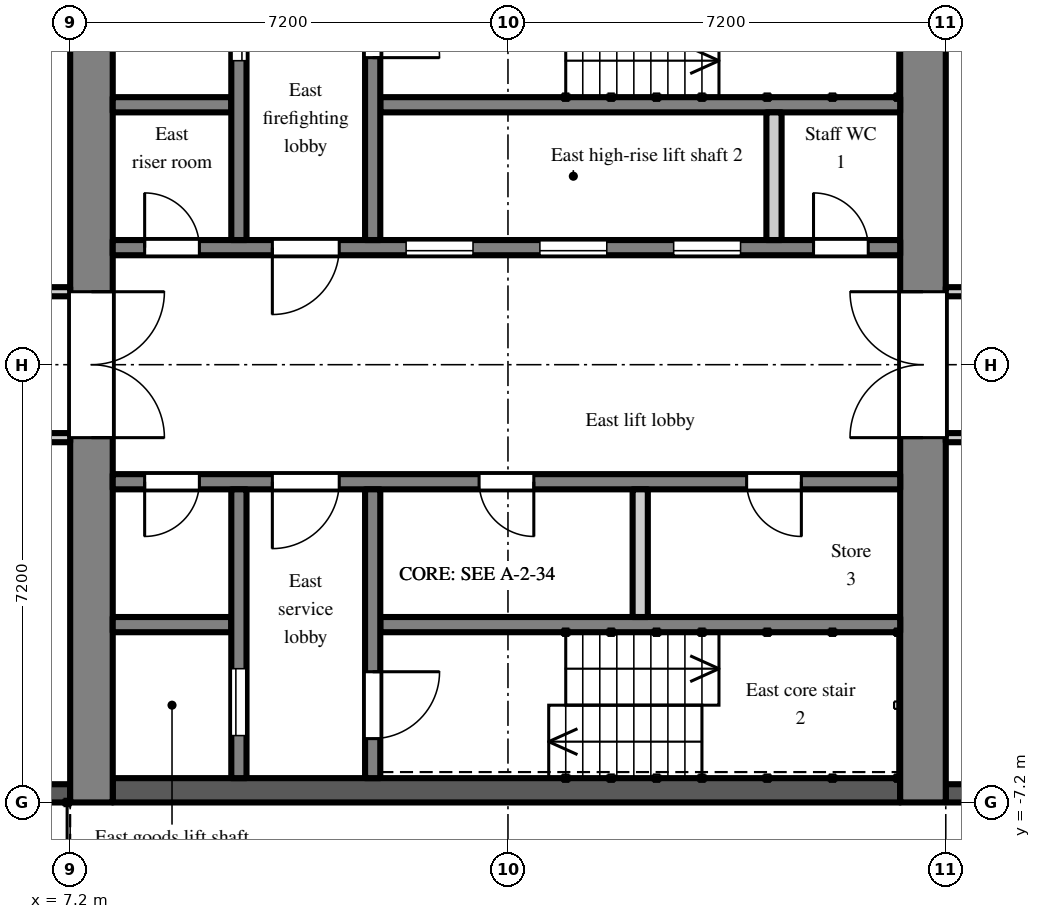
"""IFC4 building model, lengths in metres.
Left out: names, types, materials, properties, quantities, classifications, styles, units other than length and angle.
Written with IfcOpenShell. Run it as: python <this file> out.ifc"""

import sys

from ifc_helpers import new_model, si_unit, direction, frame, frame_2d, origin, place, context, subcontext, project, spatial, rectangle, extrude, element, fill, save


model = new_model("IFC4")
c1 = context("Model", 3, precision=1e-05, world=origin(), true_north=direction((0.0, 1.0)))
c2 = subcontext(c1, "Body", "Model", "MODEL_VIEW")
j1 = project(units=[si_unit("LENGTHUNIT", "METRE"), si_unit("PLANEANGLEUNIT", "RADIAN")], contexts=[c1])
p1 = place(None, origin())
s1 = spatial("IfcSite", under=j1, at=p1, CompositionType="ELEMENT")
p2 = place(p1, origin())
s2 = spatial("IfcBuilding", under=s1, at=p2, CompositionType="ELEMENT")
p3 = place(p2, frame((0.0, 0.0, 198.9)))
s3 = spatial("IfcBuildingStorey", under=s2, at=p3, CompositionType="ELEMENT", Elevation=198.9)
p4 = place(p3, frame((21.6, -7.05, 0.0), z_axis=(0.0, 0.0, 1.0), x_axis=(1.0, 0.0, 0.0)))
e1 = element("IfcWall", 1, at=p4, inside=s3, PredefinedType="SOLIDWALL", context=c2, shape_type="SweptSolid", body=[
    extrude(rectangle(XDim=2.7, YDim=0.3, at=frame_2d((1.35, 0.0))), origin(), (0.0, 0.0, 1.0), 2.3),
])
p5 = place(p4, frame((0.75, 0.0, 0.2)))
e2 = element("IfcOpeningElement", 2, at=p5, cuts=e1, PredefinedType="OPENING", context=c2, shape_type="SweptSolid", body=[
    extrude(rectangle(XDim=1.2, YDim=1.85, at=frame_2d((0.6, 0.925))), frame((0.0, 0.16, 0.0), z_axis=(0.0, -1.0, 0.0), x_axis=(1.0, 0.0, 0.0)), (0.0, 0.0, 1.0), 0.32),
])
p6 = place(p3, frame((4.2, -7.05, 0.0), z_axis=(0.0, 0.0, 1.0), x_axis=(1.0, 0.0, 0.0)))
e3 = element("IfcWall", 3, at=p6, inside=s3, PredefinedType="SOLIDWALL", context=c2, shape_type="SweptSolid", body=[
    extrude(rectangle(XDim=3.0, YDim=0.3, at=frame_2d((1.5, 0.0))), origin(), (0.0, 0.0, 1.0), 2.3),
])
p7 = place(p3, frame((7.55, -7.2, 0.0), z_axis=(0.0, 0.0, 1.0), x_axis=(0.0, 1.0, 0.0)))
e4 = element("IfcWall", 4, at=p7, inside=s3, PredefinedType="SHEAR", context=c2, shape_type="SweptSolid", body=[
    extrude(rectangle(XDim=14.4, YDim=0.7, at=frame_2d((7.2, 0.0))), origin(), (0.0, 0.0, 1.0), 2.6),
])
p8 = place(p7, frame((6.0, 0.0, 0.0)))
e5 = element("IfcOpeningElement", 5, at=p8, cuts=e4, PredefinedType="OPENING", context=c2, shape_type="SweptSolid", body=[
    extrude(rectangle(XDim=2.4, YDim=2.2, at=frame_2d((1.2, 1.1))), frame((0.0, 0.36, 0.0), z_axis=(0.0, -1.0, 0.0), x_axis=(1.0, 0.0, 0.0)), (0.0, 0.0, 1.0), 0.72),
])
p9 = place(p3, frame((21.225, -7.2, 0.0), z_axis=(0.0, 0.0, 1.0), x_axis=(0.0, 1.0, 0.0)))
e6 = element("IfcWall", 6, at=p9, inside=s3, PredefinedType="SHEAR", context=c2, shape_type="SweptSolid", body=[
    extrude(rectangle(XDim=14.4, YDim=0.75, at=frame_2d((7.2, 0.0))), origin(), (0.0, 0.0, 1.0), 2.6),
])
p10 = place(p9, frame((6.0, 0.0, 0.0)))
e7 = element("IfcOpeningElement", 7, at=p10, cuts=e6, PredefinedType="OPENING", context=c2, shape_type="SweptSolid", body=[
    extrude(rectangle(XDim=2.4, YDim=2.2, at=frame_2d((1.2, 1.1))), frame((0.0, 0.385, 0.0), z_axis=(0.0, -1.0, 0.0), x_axis=(1.0, 0.0, 0.0)), (0.0, 0.0, 1.0), 0.77),
])
p11 = place(p3, frame((7.9, 1.925, 0.0), z_axis=(0.0, 0.0, 1.0), x_axis=(1.0, 0.0, 0.0)))
e8 = element("IfcWall", 8, at=p11, inside=s3, PredefinedType="SHEAR", context=c2, shape_type="SweptSolid", body=[
    extrude(rectangle(XDim=12.95, YDim=0.25, at=frame_2d((6.475, 0.0))), origin(), (0.0, 0.0, 1.0), 2.6),
])
p12 = place(p11, frame((4.825, 0.0, 0.0)))
e9 = element("IfcOpeningElement", 9, at=p12, cuts=e8, PredefinedType="OPENING", context=c2, shape_type="SweptSolid", body=[
    extrude(rectangle(XDim=1.1, YDim=2.1, at=frame_2d((0.55, 1.05))), frame((0.0, 0.135, 0.0), z_axis=(0.0, -1.0, 0.0), x_axis=(1.0, 0.0, 0.0)), (0.0, 0.0, 1.0), 0.27),
])
p13 = place(p11, frame((7.025, 0.0, 0.0)))
e10 = element("IfcOpeningElement", 10, at=p13, cuts=e8, PredefinedType="OPENING", context=c2, shape_type="SweptSolid", body=[
    extrude(rectangle(XDim=1.1, YDim=2.1, at=frame_2d((0.55, 1.05))), frame((0.0, 0.135, 0.0), z_axis=(0.0, -1.0, 0.0), x_axis=(1.0, 0.0, 0.0)), (0.0, 0.0, 1.0), 0.27),
])
p14 = place(p11, frame((9.225, 0.0, 0.0)))
e11 = element("IfcOpeningElement", 11, at=p14, cuts=e8, PredefinedType="OPENING", context=c2, shape_type="SweptSolid", body=[
    extrude(rectangle(XDim=1.1, YDim=2.1, at=frame_2d((0.55, 1.05))), frame((0.0, 0.135, 0.0), z_axis=(0.0, -1.0, 0.0), x_axis=(1.0, 0.0, 0.0)), (0.0, 0.0, 1.0), 0.27),
])
p15 = place(p11, frame((0.525, 0.0, 0.0)))
e12 = element("IfcOpeningElement", 12, at=p15, cuts=e8, PredefinedType="OPENING", context=c2, shape_type="SweptSolid", body=[
    extrude(rectangle(XDim=0.9, YDim=2.1, at=frame_2d((0.45, 1.05))), frame((0.0, 0.135, 0.0), z_axis=(0.0, -1.0, 0.0), x_axis=(1.0, 0.0, 0.0)), (0.0, 0.0, 1.0), 0.27),
])
p16 = place(p11, frame((2.625, 0.0, 0.0)))
e13 = element("IfcOpeningElement", 13, at=p16, cuts=e8, PredefinedType="OPENING", context=c2, shape_type="SweptSolid", body=[
    extrude(rectangle(XDim=1.1, YDim=2.1, at=frame_2d((0.55, 1.05))), frame((0.0, 0.135, 0.0), z_axis=(0.0, -1.0, 0.0), x_axis=(1.0, 0.0, 0.0)), (0.0, 0.0, 1.0), 0.27),
])
p17 = place(p11, frame((11.525, 0.0, 0.0)))
e14 = element("IfcOpeningElement", 14, at=p17, cuts=e8, PredefinedType="OPENING", context=c2, shape_type="SweptSolid", body=[
    extrude(rectangle(XDim=0.9, YDim=2.1, at=frame_2d((0.45, 1.05))), frame((0.0, 0.135, 0.0), z_axis=(0.0, -1.0, 0.0), x_axis=(1.0, 0.0, 0.0)), (0.0, 0.0, 1.0), 0.27),
])
p18 = place(p3, frame((7.9, 4.275, 0.0), z_axis=(0.0, 0.0, 1.0), x_axis=(1.0, 0.0, 0.0)))
e15 = element("IfcWall", 15, at=p18, inside=s3, PredefinedType="SHEAR", context=c2, shape_type="SweptSolid", body=[
    extrude(rectangle(XDim=1.95, YDim=0.25, at=frame_2d((0.975, 0.0))), origin(), (0.0, 0.0, 1.0), 2.6),
])
p19 = place(p3, frame((12.3, 4.275, 0.0), z_axis=(0.0, 0.0, 1.0), x_axis=(1.0, 0.0, 0.0)))
e16 = element("IfcWall", 16, at=p19, inside=s3, PredefinedType="SHEAR", context=c2, shape_type="SweptSolid", body=[
    extrude(rectangle(XDim=8.55, YDim=0.25, at=frame_2d((4.275, 0.0))), origin(), (0.0, 0.0, 1.0), 2.6),
])
p20 = place(p3, frame((9.975, 2.05, 0.0), z_axis=(0.0, 0.0, 1.0), x_axis=(0.0, 1.0, 0.0)))
e17 = element("IfcWall", 17, at=p20, inside=s3, PredefinedType="SHEAR", context=c2, shape_type="SweptSolid", body=[
    extrude(rectangle(XDim=4.75, YDim=0.25, at=frame_2d((2.375, 0.0))), origin(), (0.0, 0.0, 1.0), 2.6),
])
p21 = place(p20, frame((2.95, 0.0, 0.0)))
e18 = element("IfcOpeningElement", 18, at=p21, cuts=e17, PredefinedType="OPENING", context=c2, shape_type="SweptSolid", body=[
    extrude(rectangle(XDim=1.1, YDim=2.1, at=frame_2d((0.55, 1.05))), frame((0.0, 0.135, 0.0), z_axis=(0.0, -1.0, 0.0), x_axis=(1.0, 0.0, 0.0)), (0.0, 0.0, 1.0), 0.27),
])
p22 = place(p3, frame((12.175, 2.05, 0.0), z_axis=(0.0, 0.0, 1.0), x_axis=(0.0, 1.0, 0.0)))
e19 = element("IfcWall", 19, at=p22, inside=s3, PredefinedType="SHEAR", context=c2, shape_type="SweptSolid", body=[
    extrude(rectangle(XDim=4.75, YDim=0.25, at=frame_2d((2.375, 0.0))), origin(), (0.0, 0.0, 1.0), 2.6),
])
p23 = place(p22, frame((3.0, 0.0, 0.0)))
e20 = element("IfcOpeningElement", 20, at=p23, cuts=e19, PredefinedType="OPENING", context=c2, shape_type="SweptSolid", body=[
    extrude(rectangle(XDim=1.1, YDim=2.1, at=frame_2d((0.55, 1.05))), frame((0.0, 0.135, 0.0), z_axis=(0.0, -1.0, 0.0), x_axis=(1.0, 0.0, 0.0)), (0.0, 0.0, 1.0), 0.27),
])
p24 = place(p3, frame((18.775, 2.05, 0.0), z_axis=(0.0, 0.0, 1.0), x_axis=(0.0, 1.0, 0.0)))
e21 = element("IfcWall", 21, at=p24, inside=s3, PredefinedType="PARTITIONING", context=c2, shape_type="SweptSolid", body=[
    extrude(rectangle(XDim=2.1, YDim=0.25, at=frame_2d((1.05, 0.0))), origin(), (0.0, 0.0, 1.0), 2.6),
])
p25 = place(p3, frame((7.9, -7.0, 0.0), z_axis=(0.0, 0.0, 1.0), x_axis=(1.0, 0.0, 0.0)))
e22 = element("IfcWall", 22, at=p25, inside=s3, PredefinedType="SHEAR", context=c2, shape_type="SweptSolid", body=[
    extrude(rectangle(XDim=12.95, YDim=0.4, at=frame_2d((6.475, 0.0))), origin(), (0.0, 0.0, 1.0), 2.6),
])
p26 = place(p3, frame((7.9, -1.925, 0.0), z_axis=(0.0, 0.0, 1.0), x_axis=(1.0, 0.0, 0.0)))
e23 = element("IfcWall", 23, at=p26, inside=s3, PredefinedType="SHEAR", context=c2, shape_type="SweptSolid", body=[
    extrude(rectangle(XDim=12.95, YDim=0.25, at=frame_2d((6.475, 0.0))), origin(), (0.0, 0.0, 1.0), 2.6),
])
p27 = place(p26, frame((0.525, 0.0, 0.0)))
e24 = element("IfcOpeningElement", 24, at=p27, cuts=e23, PredefinedType="OPENING", context=c2, shape_type="SweptSolid", body=[
    extrude(rectangle(XDim=0.9, YDim=2.1, at=frame_2d((0.45, 1.05))), frame((0.0, 0.135, 0.0), z_axis=(0.0, -1.0, 0.0), x_axis=(1.0, 0.0, 0.0)), (0.0, 0.0, 1.0), 0.27),
])
p28 = place(p26, frame((2.625, 0.0, 0.0)))
e25 = element("IfcOpeningElement", 25, at=p28, cuts=e23, PredefinedType="OPENING", context=c2, shape_type="SweptSolid", body=[
    extrude(rectangle(XDim=1.1, YDim=2.1, at=frame_2d((0.55, 1.05))), frame((0.0, 0.135, 0.0), z_axis=(0.0, -1.0, 0.0), x_axis=(1.0, 0.0, 0.0)), (0.0, 0.0, 1.0), 0.27),
])
p29 = place(p26, frame((6.025, 0.0, 0.0)))
e26 = element("IfcOpeningElement", 26, at=p29, cuts=e23, PredefinedType="OPENING", context=c2, shape_type="SweptSolid", body=[
    extrude(rectangle(XDim=0.9, YDim=2.1, at=frame_2d((0.45, 1.05))), frame((0.0, 0.135, 0.0), z_axis=(0.0, -1.0, 0.0), x_axis=(1.0, 0.0, 0.0)), (0.0, 0.0, 1.0), 0.27),
])
p30 = place(p26, frame((10.425, 0.0, 0.0)))
e27 = element("IfcOpeningElement", 27, at=p30, cuts=e23, PredefinedType="OPENING", context=c2, shape_type="SweptSolid", body=[
    extrude(rectangle(XDim=0.9, YDim=2.1, at=frame_2d((0.45, 1.05))), frame((0.0, 0.135, 0.0), z_axis=(0.0, -1.0, 0.0), x_axis=(1.0, 0.0, 0.0)), (0.0, 0.0, 1.0), 0.27),
])
p31 = place(p3, frame((7.9, -4.275, 0.0), z_axis=(0.0, 0.0, 1.0), x_axis=(1.0, 0.0, 0.0)))
e28 = element("IfcWall", 28, at=p31, inside=s3, PredefinedType="SHEAR", context=c2, shape_type="SweptSolid", body=[
    extrude(rectangle(XDim=1.95, YDim=0.25, at=frame_2d((0.975, 0.0))), origin(), (0.0, 0.0, 1.0), 2.6),
])
p32 = place(p3, frame((12.3, -4.275, 0.0), z_axis=(0.0, 0.0, 1.0), x_axis=(1.0, 0.0, 0.0)))
e29 = element("IfcWall", 29, at=p32, inside=s3, PredefinedType="SHEAR", context=c2, shape_type="SweptSolid", body=[
    extrude(rectangle(XDim=8.55, YDim=0.25, at=frame_2d((4.275, 0.0))), origin(), (0.0, 0.0, 1.0), 2.6),
])
p33 = place(p3, frame((9.975, -2.05, 0.0), z_axis=(0.0, 0.0, 1.0), x_axis=(0.0, -1.0, 0.0)))
e30 = element("IfcWall", 30, at=p33, inside=s3, PredefinedType="SHEAR", context=c2, shape_type="SweptSolid", body=[
    extrude(rectangle(XDim=4.75, YDim=0.25, at=frame_2d((2.375, 0.0))), origin(), (0.0, 0.0, 1.0), 2.6),
])
p34 = place(p33, frame((2.95, 0.0, 0.0)))
e31 = element("IfcOpeningElement", 31, at=p34, cuts=e30, PredefinedType="OPENING", context=c2, shape_type="SweptSolid", body=[
    extrude(rectangle(XDim=1.1, YDim=2.1, at=frame_2d((0.55, 1.05))), frame((0.0, 0.135, 0.0), z_axis=(0.0, -1.0, 0.0), x_axis=(1.0, 0.0, 0.0)), (0.0, 0.0, 1.0), 0.27),
])
p35 = place(p3, frame((12.175, -2.05, 0.0), z_axis=(0.0, 0.0, 1.0), x_axis=(0.0, -1.0, 0.0)))
e32 = element("IfcWall", 32, at=p35, inside=s3, PredefinedType="SHEAR", context=c2, shape_type="SweptSolid", body=[
    extrude(rectangle(XDim=4.75, YDim=0.25, at=frame_2d((2.375, 0.0))), origin(), (0.0, 0.0, 1.0), 2.6),
])
p36 = place(p35, frame((3.0, 0.0, 0.0)))
e33 = element("IfcOpeningElement", 33, at=p36, cuts=e32, PredefinedType="OPENING", context=c2, shape_type="SweptSolid", body=[
    extrude(rectangle(XDim=1.1, YDim=2.1, at=frame_2d((0.55, 1.05))), frame((0.0, 0.135, 0.0), z_axis=(0.0, -1.0, 0.0), x_axis=(1.0, 0.0, 0.0)), (0.0, 0.0, 1.0), 0.27),
])
p37 = place(p3, frame((16.575, -2.05, 0.0), z_axis=(0.0, 0.0, 1.0), x_axis=(0.0, -1.0, 0.0)))
e34 = element("IfcWall", 34, at=p37, inside=s3, PredefinedType="PARTITIONING", context=c2, shape_type="SweptSolid", body=[
    extrude(rectangle(XDim=2.1, YDim=0.25, at=frame_2d((1.05, 0.0))), origin(), (0.0, 0.0, 1.0), 2.6),
])
p38 = place(p3, frame((1.275, -1.2, 0.0), z_axis=(0.0, 0.0, 1.0), x_axis=(1.0, 0.0, 0.0)))
e35 = element("IfcWall", 35, at=p38, inside=s3, PredefinedType="PARTITIONING", context=c2, shape_type="SweptSolid", body=[
    extrude(rectangle(XDim=5.925, YDim=0.15, at=frame_2d((2.962, 0.0))), origin(), (0.0, 0.0, 1.0), 2.6),
])
p39 = place(p38, frame((3.075, 0.0, 0.0)))
e36 = element("IfcOpeningElement", 36, at=p39, cuts=e35, PredefinedType="OPENING", context=c2, shape_type="SweptSolid", body=[
    extrude(rectangle(XDim=0.9, YDim=2.1, at=frame_2d((0.45, 1.05))), frame((0.0, 0.085, 0.0), z_axis=(0.0, -1.0, 0.0), x_axis=(1.0, 0.0, 0.0)), (0.0, 0.0, 1.0), 0.17),
])
p40 = place(p3, frame((1.275, 1.2, 0.0), z_axis=(0.0, 0.0, 1.0), x_axis=(1.0, 0.0, 0.0)))
e37 = element("IfcWall", 37, at=p40, inside=s3, PredefinedType="PARTITIONING", context=c2, shape_type="SweptSolid", body=[
    extrude(rectangle(XDim=5.925, YDim=0.15, at=frame_2d((2.962, 0.0))), origin(), (0.0, 0.0, 1.0), 2.6),
])
p41 = place(p40, frame((3.975, 0.0, 0.0)))
e38 = element("IfcOpeningElement", 38, at=p41, cuts=e37, PredefinedType="OPENING", context=c2, shape_type="SweptSolid", body=[
    extrude(rectangle(XDim=0.9, YDim=2.1, at=frame_2d((0.45, 1.05))), frame((0.0, 0.085, 0.0), z_axis=(0.0, -1.0, 0.0), x_axis=(1.0, 0.0, 0.0)), (0.0, 0.0, 1.0), 0.17),
])
p42 = place(p3, frame((21.6, -1.2, 0.0), z_axis=(0.0, 0.0, 1.0), x_axis=(1.0, 0.0, 0.0)))
e39 = element("IfcWall", 39, at=p42, inside=s3, PredefinedType="PARTITIONING", context=c2, shape_type="SweptSolid", body=[
    extrude(rectangle(XDim=3.525, YDim=0.15, at=frame_2d((1.762, 0.0))), origin(), (0.0, 0.0, 1.0), 2.6),
])
p43 = place(p42, frame((0.9, 0.0, 0.0)))
e40 = element("IfcOpeningElement", 40, at=p43, cuts=e39, PredefinedType="OPENING", context=c2, shape_type="SweptSolid", body=[
    extrude(rectangle(XDim=1.8, YDim=2.1, at=frame_2d((0.9, 1.05))), frame((0.0, 0.085, 0.0), z_axis=(0.0, -1.0, 0.0), x_axis=(1.0, 0.0, 0.0)), (0.0, 0.0, 1.0), 0.17),
])
p44 = place(p3, frame((21.6, 1.2, 0.0), z_axis=(0.0, 0.0, 1.0), x_axis=(1.0, 0.0, 0.0)))
e41 = element("IfcWall", 41, at=p44, inside=s3, PredefinedType="PARTITIONING", context=c2, shape_type="SweptSolid", body=[
    extrude(rectangle(XDim=3.525, YDim=0.15, at=frame_2d((1.762, 0.0))), origin(), (0.0, 0.0, 1.0), 2.6),
])
p45 = place(p44, frame((0.9, 0.0, 0.0)))
e42 = element("IfcOpeningElement", 42, at=p45, cuts=e41, PredefinedType="OPENING", context=c2, shape_type="SweptSolid", body=[
    extrude(rectangle(XDim=1.8, YDim=2.1, at=frame_2d((0.9, 1.05))), frame((0.0, 0.085, 0.0), z_axis=(0.0, -1.0, 0.0), x_axis=(1.0, 0.0, 0.0)), (0.0, 0.0, 1.0), 0.17),
])
p46 = place(p12, origin())
e43 = element("IfcDoor", 43, at=p46, inside=s3, OperationType="SLIDING_TO_LEFT", PredefinedType="DOOR", context=c2, shape_type="SweptSolid", body=[
    extrude(rectangle(XDim=1.1, YDim=2.1, at=frame_2d((0.55, 1.05))), frame((0.0, 0.025, 0.0), z_axis=(0.0, -1.0, 0.0), x_axis=(1.0, 0.0, 0.0)), (0.0, 0.0, 1.0), 0.05),
])
fill(e9, e43)
p47 = place(p13, origin())
e44 = element("IfcDoor", 44, at=p47, inside=s3, OperationType="SLIDING_TO_LEFT", PredefinedType="DOOR", context=c2, shape_type="SweptSolid", body=[
    extrude(rectangle(XDim=1.1, YDim=2.1, at=frame_2d((0.55, 1.05))), frame((0.0, 0.025, 0.0), z_axis=(0.0, -1.0, 0.0), x_axis=(1.0, 0.0, 0.0)), (0.0, 0.0, 1.0), 0.05),
])
fill(e10, e44)
p48 = place(p14, origin())
e45 = element("IfcDoor", 45, at=p48, inside=s3, OperationType="SLIDING_TO_LEFT", PredefinedType="DOOR", context=c2, shape_type="SweptSolid", body=[
    extrude(rectangle(XDim=1.1, YDim=2.1, at=frame_2d((0.55, 1.05))), frame((0.0, 0.025, 0.0), z_axis=(0.0, -1.0, 0.0), x_axis=(1.0, 0.0, 0.0)), (0.0, 0.0, 1.0), 0.05),
])
fill(e11, e45)
p49 = place(p21, origin())
e46 = element("IfcDoor", 46, at=p49, inside=s3, OperationType="SLIDING_TO_LEFT", PredefinedType="DOOR", context=c2, shape_type="SweptSolid", body=[
    extrude(rectangle(XDim=1.1, YDim=2.1, at=frame_2d((0.55, 1.05))), frame((0.0, 0.025, 0.0), z_axis=(0.0, -1.0, 0.0), x_axis=(1.0, 0.0, 0.0)), (0.0, 0.0, 1.0), 0.05),
])
fill(e18, e46)
p50 = place(p34, origin())
e47 = element("IfcDoor", 47, at=p50, inside=s3, OperationType="SLIDING_TO_LEFT", PredefinedType="DOOR", context=c2, shape_type="SweptSolid", body=[
    extrude(rectangle(XDim=1.1, YDim=2.1, at=frame_2d((0.55, 1.05))), frame((0.0, 0.025, 0.0), z_axis=(0.0, -1.0, 0.0), x_axis=(1.0, 0.0, 0.0)), (0.0, 0.0, 1.0), 0.05),
])
fill(e31, e47)
p51 = place(p23, frame((1.1, 0.0, 0.0), z_axis=(0.0, 0.0, 1.0), x_axis=(-1.0, 0.0, 0.0)))
e48 = element("IfcDoor", 48, at=p51, inside=s3, OperationType="SINGLE_SWING_RIGHT", PredefinedType="DOOR", context=c2, shape_type="SweptSolid", body=[
    extrude(rectangle(XDim=1.1, YDim=2.1, at=frame_2d((0.55, 1.05))), frame((0.0, 0.025, 0.0), z_axis=(0.0, -1.0, 0.0), x_axis=(1.0, 0.0, 0.0)), (0.0, 0.0, 1.0), 0.05),
])
fill(e20, e48)
p52 = place(p36, origin())
e49 = element("IfcDoor", 49, at=p52, inside=s3, OperationType="SINGLE_SWING_LEFT", PredefinedType="DOOR", context=c2, shape_type="SweptSolid", body=[
    extrude(rectangle(XDim=1.1, YDim=2.1, at=frame_2d((0.55, 1.05))), frame((0.0, 0.025, 0.0), z_axis=(0.0, -1.0, 0.0), x_axis=(1.0, 0.0, 0.0)), (0.0, 0.0, 1.0), 0.05),
])
fill(e33, e49)
p53 = place(p15, origin())
e50 = element("IfcDoor", 50, at=p53, inside=s3, OperationType="SINGLE_SWING_LEFT", PredefinedType="DOOR", context=c2, shape_type="SweptSolid", body=[
    extrude(rectangle(XDim=0.9, YDim=2.1, at=frame_2d((0.45, 1.05))), frame((0.0, 0.025, 0.0), z_axis=(0.0, -1.0, 0.0), x_axis=(1.0, 0.0, 0.0)), (0.0, 0.0, 1.0), 0.05),
])
fill(e12, e50)
p54 = place(p27, frame((0.9, 0.0, 0.0), z_axis=(0.0, 0.0, 1.0), x_axis=(-1.0, 0.0, 0.0)))
e51 = element("IfcDoor", 51, at=p54, inside=s3, OperationType="SINGLE_SWING_RIGHT", PredefinedType="DOOR", context=c2, shape_type="SweptSolid", body=[
    extrude(rectangle(XDim=0.9, YDim=2.1, at=frame_2d((0.45, 1.05))), frame((0.0, 0.025, 0.0), z_axis=(0.0, -1.0, 0.0), x_axis=(1.0, 0.0, 0.0)), (0.0, 0.0, 1.0), 0.05),
])
fill(e24, e51)
p55 = place(p16, frame((1.1, 0.0, 0.0), z_axis=(0.0, 0.0, 1.0), x_axis=(-1.0, 0.0, 0.0)))
e52 = element("IfcDoor", 52, at=p55, inside=s3, OperationType="SINGLE_SWING_RIGHT", PredefinedType="DOOR", context=c2, shape_type="SweptSolid", body=[
    extrude(rectangle(XDim=1.1, YDim=2.1, at=frame_2d((0.55, 1.05))), frame((0.0, 0.025, 0.0), z_axis=(0.0, -1.0, 0.0), x_axis=(1.0, 0.0, 0.0)), (0.0, 0.0, 1.0), 0.05),
])
fill(e13, e52)
p56 = place(p28, frame((1.1, 0.0, 0.0), z_axis=(0.0, 0.0, 1.0), x_axis=(-1.0, 0.0, 0.0)))
e53 = element("IfcDoor", 53, at=p56, inside=s3, OperationType="SINGLE_SWING_RIGHT", PredefinedType="DOOR", context=c2, shape_type="SweptSolid", body=[
    extrude(rectangle(XDim=1.1, YDim=2.1, at=frame_2d((0.55, 1.05))), frame((0.0, 0.025, 0.0), z_axis=(0.0, -1.0, 0.0), x_axis=(1.0, 0.0, 0.0)), (0.0, 0.0, 1.0), 0.05),
])
fill(e25, e53)
p57 = place(p8, frame((2.4, 0.0, 0.0), z_axis=(0.0, 0.0, 1.0), x_axis=(-1.0, 0.0, 0.0)))
e54 = element("IfcDoor", 54, at=p57, inside=s3, OperationType="DOUBLE_DOOR_DOUBLE_SWING", PredefinedType="DOOR", context=c2, shape_type="SweptSolid", body=[
    extrude(rectangle(XDim=2.4, YDim=2.2, at=frame_2d((1.2, 1.1))), frame((0.0, 0.025, 0.0), z_axis=(0.0, -1.0, 0.0), x_axis=(1.0, 0.0, 0.0)), (0.0, 0.0, 1.0), 0.05),
])
fill(e5, e54)
p58 = place(p10, origin())
e55 = element("IfcDoor", 55, at=p58, inside=s3, OperationType="DOUBLE_DOOR_DOUBLE_SWING", PredefinedType="DOOR", context=c2, shape_type="SweptSolid", body=[
    extrude(rectangle(XDim=2.4, YDim=2.2, at=frame_2d((1.2, 1.1))), frame((0.0, 0.025, 0.0), z_axis=(0.0, -1.0, 0.0), x_axis=(1.0, 0.0, 0.0)), (0.0, 0.0, 1.0), 0.05),
])
fill(e7, e55)
p59 = place(p17, origin())
e56 = element("IfcDoor", 56, at=p59, inside=s3, OperationType="SINGLE_SWING_LEFT", PredefinedType="DOOR", context=c2, shape_type="SweptSolid", body=[
    extrude(rectangle(XDim=0.9, YDim=2.1, at=frame_2d((0.45, 1.05))), frame((0.0, 0.025, 0.0), z_axis=(0.0, -1.0, 0.0), x_axis=(1.0, 0.0, 0.0)), (0.0, 0.0, 1.0), 0.05),
])
fill(e14, e56)
p60 = place(p29, frame((0.9, 0.0, 0.0), z_axis=(0.0, 0.0, 1.0), x_axis=(-1.0, 0.0, 0.0)))
e57 = element("IfcDoor", 57, at=p60, inside=s3, OperationType="SINGLE_SWING_LEFT", PredefinedType="DOOR", context=c2, shape_type="SweptSolid", body=[
    extrude(rectangle(XDim=0.9, YDim=2.1, at=frame_2d((0.45, 1.05))), frame((0.0, 0.025, 0.0), z_axis=(0.0, -1.0, 0.0), x_axis=(1.0, 0.0, 0.0)), (0.0, 0.0, 1.0), 0.05),
])
fill(e26, e57)
p61 = place(p30, frame((0.9, 0.0, 0.0), z_axis=(0.0, 0.0, 1.0), x_axis=(-1.0, 0.0, 0.0)))
e58 = element("IfcDoor", 58, at=p61, inside=s3, OperationType="SINGLE_SWING_LEFT", PredefinedType="DOOR", context=c2, shape_type="SweptSolid", body=[
    extrude(rectangle(XDim=0.9, YDim=2.1, at=frame_2d((0.45, 1.05))), frame((0.0, 0.025, 0.0), z_axis=(0.0, -1.0, 0.0), x_axis=(1.0, 0.0, 0.0)), (0.0, 0.0, 1.0), 0.05),
])
fill(e27, e58)
save(model, sys.argv[1])
